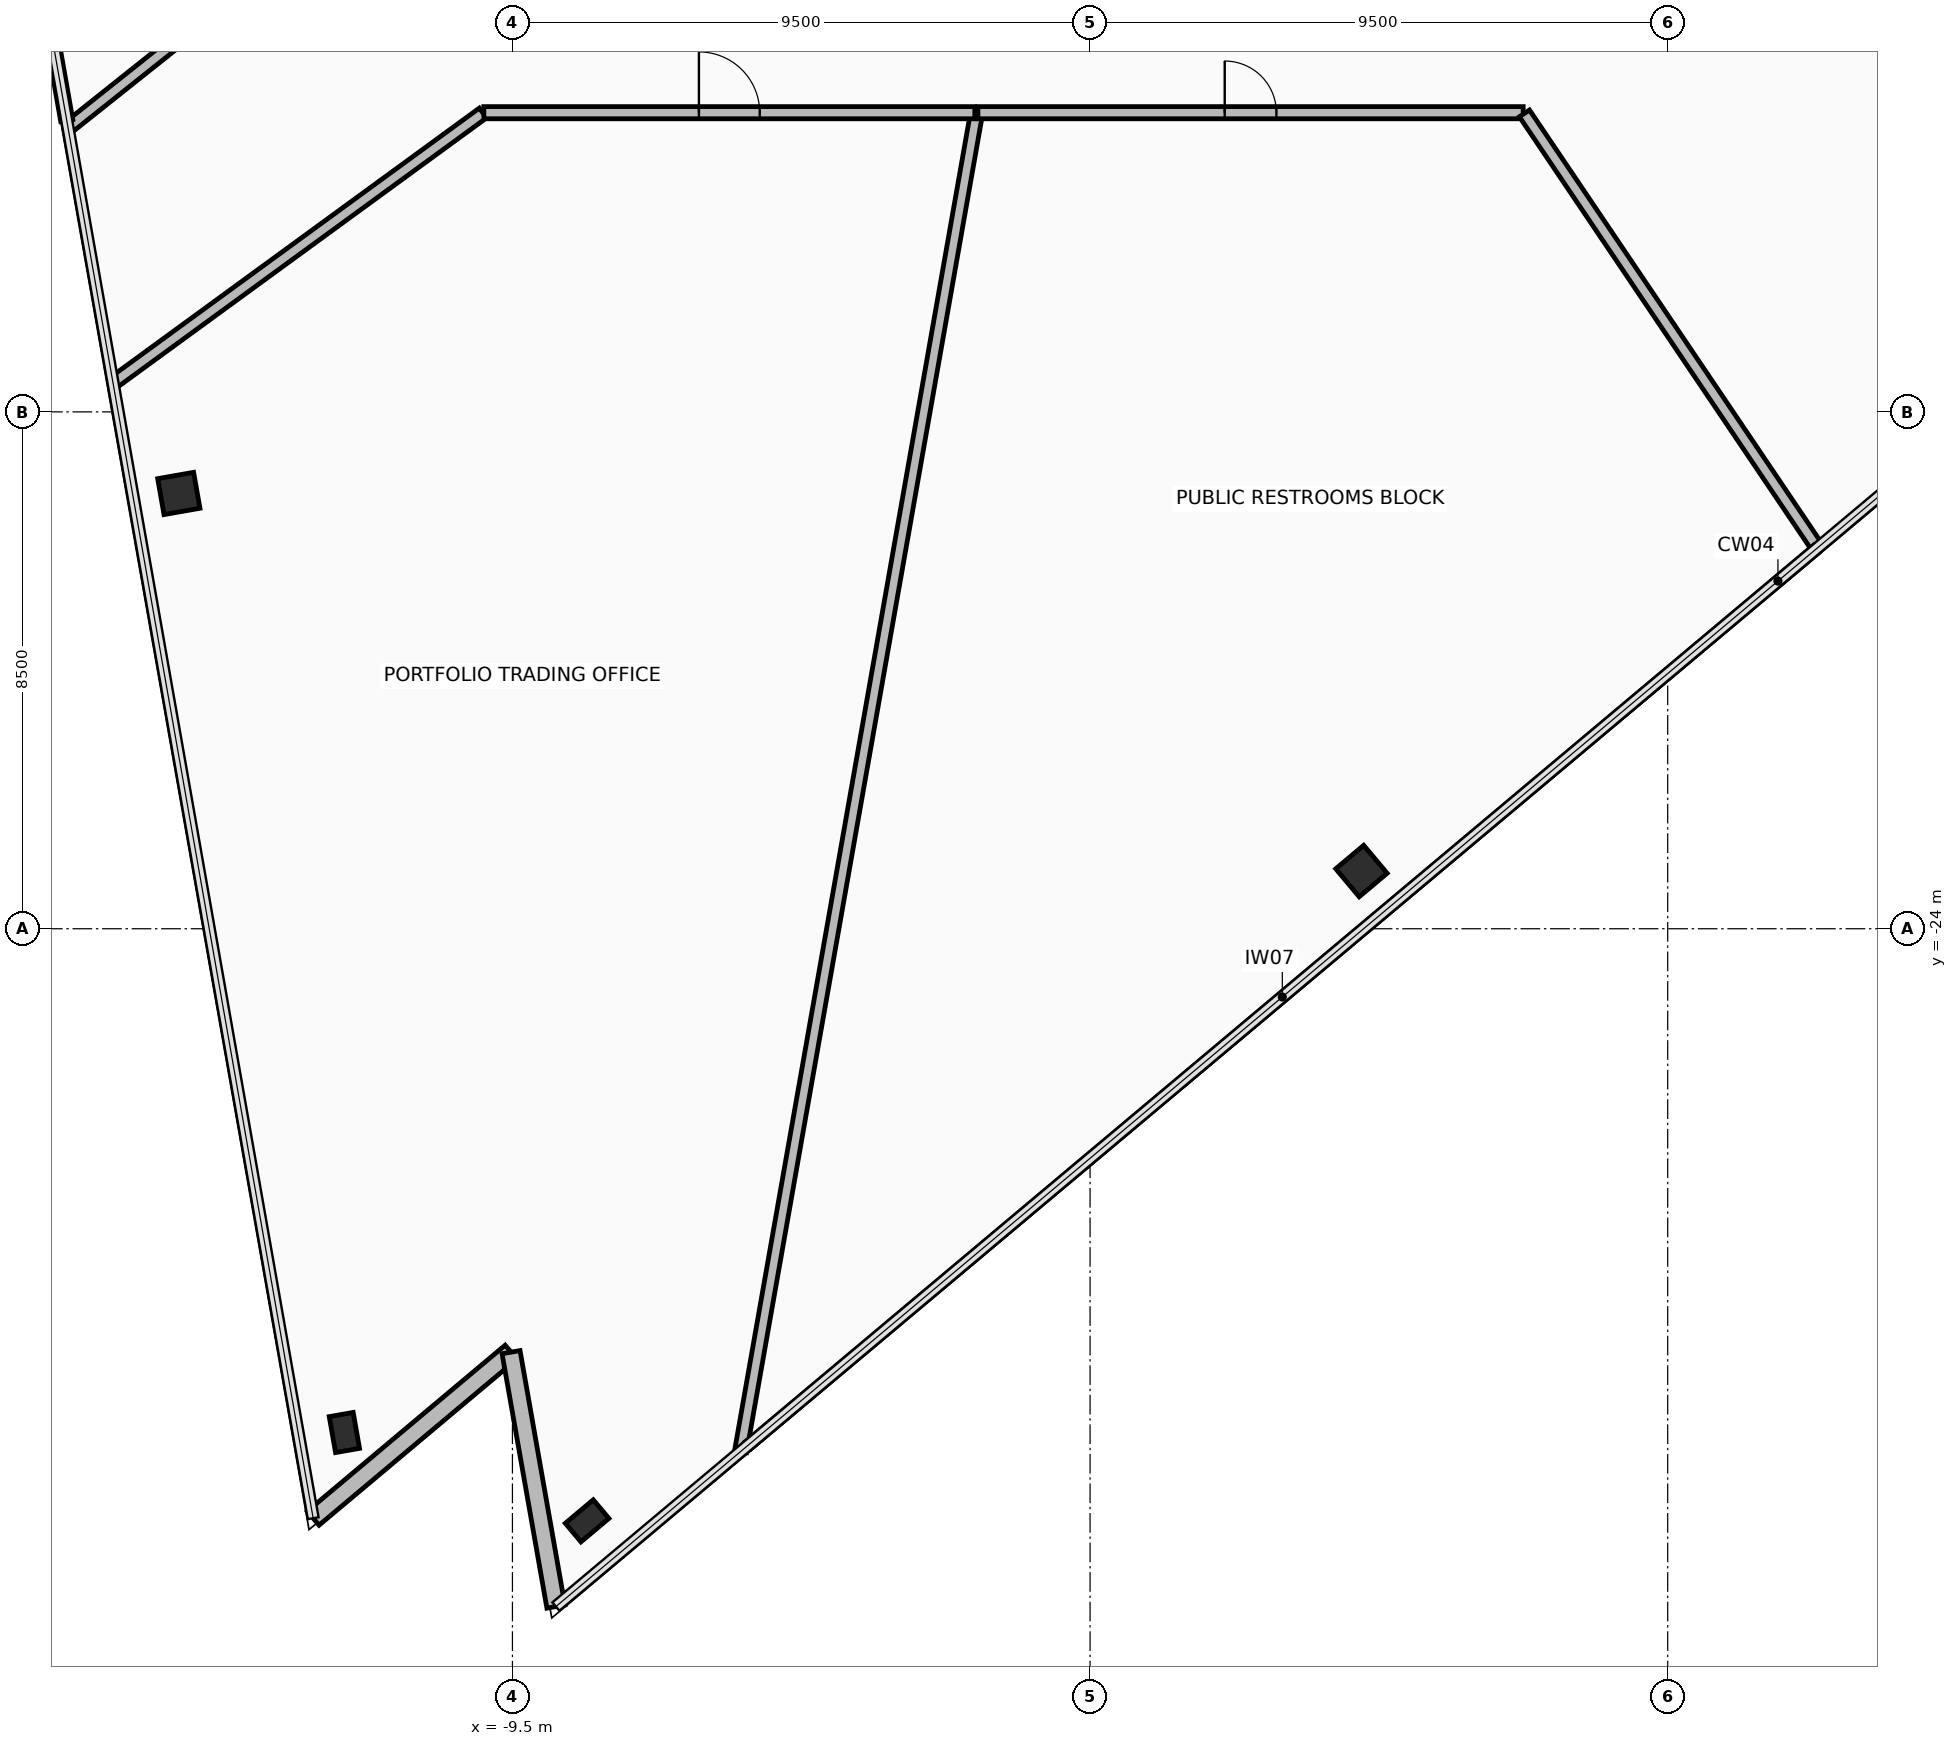
"""IFC4 building model, lengths in metres.
Left out: names, types, materials, properties, quantities, classifications, styles, units other than length and angle.
Written with IfcOpenShell. Run it as: python <this file> out.ifc"""

import sys

from ifc_helpers import new_model, si_unit, direction, frame, frame_2d, origin, origin_2d, place, context, subcontext, project, spatial, rectangle, hollow_rectangle, extrude, element, fill, save


model = new_model("IFC4")
c1 = context("Model", 3, precision=1e-05, world=origin(), true_north=direction((0.0, 1.0)))
c2 = subcontext(c1, "Body", "Model", "MODEL_VIEW")
j1 = project(units=[si_unit("LENGTHUNIT", "METRE"), si_unit("PLANEANGLEUNIT", "RADIAN")], contexts=[c1])
p1 = place(None, origin())
s1 = spatial("IfcSite", under=j1, at=p1, CompositionType="ELEMENT")
p2 = place(p1, origin())
s2 = spatial("IfcBuilding", under=s1, at=p2, CompositionType="ELEMENT")
p3 = place(p2, frame((0.0, 0.0, 170.5)))
s3 = spatial("IfcBuildingStorey", under=s2, at=p3, CompositionType="ELEMENT", Elevation=170.5)
p4 = place(p3, frame((-14.987, -16.842, 0.0), z_axis=(0.0, 0.0, 1.0), x_axis=(-0.173648177667, 0.984807753012, 0.0)))
e1 = element("IfcColumn", 1, at=p4, inside=s3, PredefinedType="COLUMN", context=c2, shape_type="SweptSolid", body=[
    extrude(hollow_rectangle(XDim=0.6, YDim=0.6, WallThickness=0.036, at=origin_2d()), origin(), (0.0, 0.0, 1.0), 3.6),
])
for number, where, z_axis, x_axis in (
    (2, (-12.264, -32.284, 0.0), (0.0, 0.0, 1.0), (-0.174, 0.985, 0.0)),
    (3, (-8.272, -33.737, 0.0), (0.0, 0.0, 1.0), (0.766, 0.643, 0.0)),
):
    element("IfcColumn", number, at=place(p3, frame(where, z_axis=z_axis, x_axis=x_axis)), inside=s3, PredefinedType="COLUMN", context=c2, shape_type="SweptSolid", body=[
        extrude(hollow_rectangle(XDim=0.4, YDim=0.6, WallThickness=0.03, at=origin_2d()), origin(), (0.0, 0.0, 1.0), 3.6),
    ])
p5 = place(p3, frame((4.463, -23.051, 0.0), z_axis=(0.0, 0.0, 1.0), x_axis=(0.766043321242, 0.642788946685, 0.0)))
e4 = element("IfcColumn", 4, at=p5, inside=s3, PredefinedType="COLUMN", context=c2, shape_type="SweptSolid", body=[
    extrude(hollow_rectangle(XDim=0.6, YDim=0.6, WallThickness=0.036, at=origin_2d()), origin(), (0.0, 0.0, 1.0), 3.6),
])
for number, where, z_axis, x_axis in (
    (5, (-12.777, -33.694, 0.0), (0.0, 0.0, 1.0), (0.766, 0.643, 0.0)),
    (6, (-9.523, -30.963, 0.0), (0.0, 0.0, 1.0), (0.174, -0.985, 0.0)),
):
    element("IfcWall", number, at=place(p3, frame(where, z_axis=z_axis, x_axis=x_axis)), inside=s3, PredefinedType="STANDARD", context=c2, shape_type="SweptSolid", body=[
        extrude(rectangle(XDim=4.248, YDim=0.3, at=frame_2d((2.124, 0.0))), origin(), (0.0, 0.0, 1.0), 2.715),
    ])
p6 = place(p3, frame((-11.889, -6.911, 0.0), z_axis=(0.0, 0.0, 1.0), x_axis=(-0.782381746657, -0.622799167066, 0.0)))
e7 = element("IfcWall", 7, at=p6, inside=s3, PredefinedType="PARTITIONING", context=c2, shape_type="SweptSolid", body=[
    extrude(rectangle(XDim=6.288, YDim=0.2, at=frame_2d((3.144, 0.0))), origin(), (0.0, 0.0, 1.0), 2.715),
])
p7 = place(p3, frame((-16.83, -10.709, 0.0), z_axis=(0.0, 0.0, 1.0), x_axis=(-0.173641964803, 0.984808848487, 0.0)))
e8 = element("IfcWall", 8, at=p7, inside=s3, PredefinedType="PARTITIONING", context=c2, shape_type="SweptSolid", body=[
    extrude(rectangle(XDim=13.503, YDim=0.2, at=frame_2d((6.751, 0.0))), origin(), (0.0, 0.0, 1.0), 3.42),
])
p8 = place(p3, frame((-5.748, -32.598, 0.0), z_axis=(0.0, 0.0, 1.0), x_axis=(0.17364192413, 0.984808855659, 0.0)))
e9 = element("IfcWall", 9, at=p8, inside=s3, PredefinedType="PARTITIONING", context=c2, shape_type="SweptSolid", body=[
    extrude(rectangle(XDim=22.337, YDim=0.2, at=frame_2d((11.168, 0.0))), origin(), (0.0, 0.0, 1.0), 2.715),
])
p9 = place(p3, frame((-1.844, -10.58, 0.0), z_axis=(0.0, 0.0, 1.0), x_axis=(1.0, 0.0, 0.0)))
e10 = element("IfcWall", 10, at=p9, inside=s3, PredefinedType="PARTITIONING", context=c2, shape_type="SweptSolid", body=[
    extrude(rectangle(XDim=8.968, YDim=0.2, at=frame_2d((4.484, 0.0))), origin(), (0.0, 0.0, 1.0), 3.42),
])
p10 = place(p9, frame((4.059, 0.0, 0.0)))
e11 = element("IfcOpeningElement", 11, at=p10, cuts=e10, PredefinedType="OPENING", context=c2, shape_type="SweptSolid", body=[
    extrude(rectangle(XDim=0.85, YDim=2.1, at=frame_2d((0.425, 1.05))), frame((0.0, 0.11, 0.0), z_axis=(0.0, -1.0, 0.0), x_axis=(1.0, 0.0, 0.0)), (0.0, 0.0, 1.0), 0.22),
])
p11 = place(p3, frame((7.144, -10.591, 0.0), z_axis=(0.0, 0.0, 1.0), x_axis=(0.559187972466, -0.829040898539, 0.0)))
e12 = element("IfcWall", 12, at=p11, inside=s3, PredefinedType="PARTITIONING", context=c2, shape_type="SweptSolid", body=[
    extrude(rectangle(XDim=8.597, YDim=0.2, at=frame_2d((4.298, 0.0))), origin(), (0.0, 0.0, 1.0), 2.715),
])
p12 = place(p3, frame((11.946, -17.751, 0.0), z_axis=(0.0, 0.0, 1.0), x_axis=(-0.76604510754, -0.64278681786, 0.0)))
e13 = element("IfcWall", 13, at=p12, inside=s3, PredefinedType="PARTITIONING", context=c2, shape_type="SweptSolid", body=[
    extrude(rectangle(XDim=22.935, YDim=0.15, at=frame_2d((11.467, 0.0))), origin(), (0.0, 0.0, 1.0), 3.42),
])
p13 = place(p3, frame((-16.069, -15.024, 0.0), z_axis=(0.0, 0.0, 1.0), x_axis=(0.807835167635, 0.589408467815, 0.0)))
e14 = element("IfcWall", 14, at=p13, inside=s3, PredefinedType="PARTITIONING", context=c2, shape_type="SweptSolid", body=[
    extrude(rectangle(XDim=7.531, YDim=0.2, at=frame_2d((3.766, 0.0))), origin(), (0.0, 0.0, 1.0), 2.715),
])
p14 = place(p3, frame((-9.97, -10.58, 0.0), z_axis=(0.0, 0.0, 1.0), x_axis=(1.0, 0.0, 0.0)))
e15 = element("IfcWall", 15, at=p14, inside=s3, PredefinedType="PARTITIONING", context=c2, shape_type="SweptSolid", body=[
    extrude(rectangle(XDim=8.075, YDim=0.2, at=frame_2d((4.037, 0.0))), origin(), (0.0, 0.0, 1.0), 2.865),
])
p15 = place(p14, frame((3.537, 0.0, 0.0)))
e16 = element("IfcOpeningElement", 16, at=p15, cuts=e15, PredefinedType="OPENING", context=c2, shape_type="SweptSolid", body=[
    extrude(rectangle(XDim=1.0, YDim=2.15, at=frame_2d((0.5, 1.075))), frame((0.0, 0.11, 0.0), z_axis=(0.0, -1.0, 0.0), x_axis=(1.0, 0.0, 0.0)), (0.0, 0.0, 1.0), 0.22),
])
p16 = place(p3, frame((18.548, -12.211, 0.0), z_axis=(0.0, 0.0, 1.0), x_axis=(-0.782380574332, 0.622800639778, 0.0)))
e17 = element("IfcWall", 17, at=p16, inside=s3, PredefinedType="PARTITIONING", context=c2, shape_type="SweptSolid", body=[
    extrude(rectangle(XDim=8.511, YDim=0.2, at=frame_2d((4.255, 0.0))), origin(), (0.0, 0.0, 1.0), 2.715),
])
p17 = place(p16, frame((3.655, 0.0, 0.0)))
e18 = element("IfcOpeningElement", 18, at=p17, cuts=e17, PredefinedType="OPENING", context=c2, shape_type="SweptSolid", body=[
    extrude(rectangle(XDim=1.2, YDim=2.15, at=frame_2d((0.6, 1.075))), frame((0.0, 0.11, 0.0), z_axis=(0.0, -1.0, 0.0), x_axis=(1.0, 0.0, 0.0)), (0.0, 0.0, 1.0), 0.22),
])
p18 = place(p10, origin())
e19 = element("IfcDoor", 19, at=p18, inside=s3, OperationType="SINGLE_SWING_RIGHT", PredefinedType="DOOR", context=c2, shape_type="SweptSolid", body=[
    extrude(rectangle(XDim=0.85, YDim=2.1, at=frame_2d((0.425, 1.05))), frame((0.0, 0.025, 0.0), z_axis=(0.0, -1.0, 0.0), x_axis=(1.0, 0.0, 0.0)), (0.0, 0.0, 1.0), 0.05),
])
fill(e11, e19)
p19 = place(p15, origin())
e20 = element("IfcDoor", 20, at=p19, inside=s3, OperationType="SINGLE_SWING_RIGHT", PredefinedType="DOOR", context=c2, shape_type="SweptSolid", body=[
    extrude(rectangle(XDim=1.0, YDim=2.15, at=frame_2d((0.5, 1.075))), frame((0.0, 0.025, 0.0), z_axis=(0.0, -1.0, 0.0), x_axis=(1.0, 0.0, 0.0)), (0.0, 0.0, 1.0), 0.05),
])
fill(e16, e20)
save(model, sys.argv[1])
